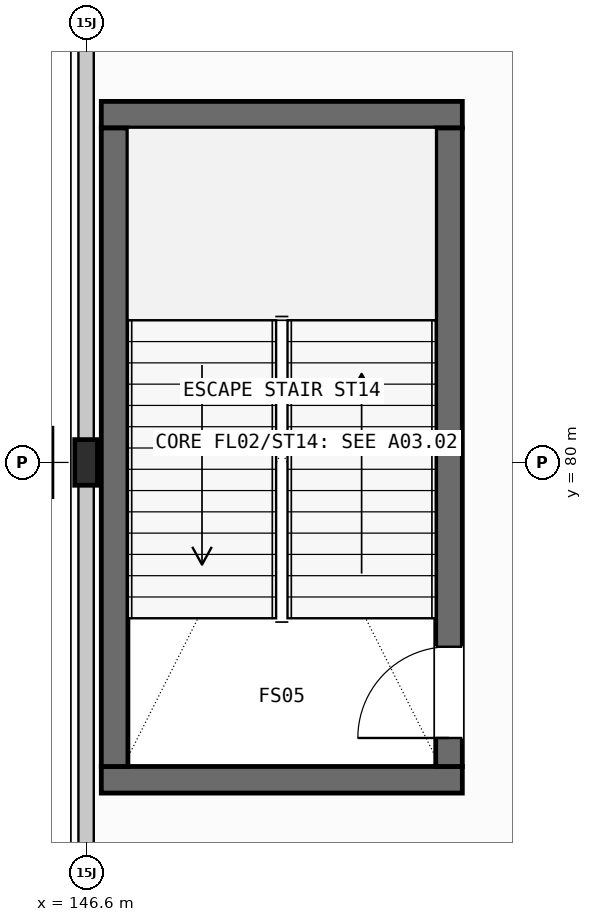
"""IFC4 building model, lengths in metres.
Left out: names, types, materials, properties, quantities, classifications, styles, units other than length and angle.
Written with IfcOpenShell. Run it as: python <this file> out.ifc"""

import sys

from ifc_helpers import new_model, si_unit, direction, frame, frame_2d, origin, origin_2d, place, context, subcontext, project, spatial, rectangle, i_section, extrude, element, fill, save


model = new_model("IFC4")
c1 = context("Model", 3, precision=1e-05, world=origin(), true_north=direction((0.0, 1.0)))
c2 = subcontext(c1, "Body", "Model", "MODEL_VIEW")
j1 = project(units=[si_unit("LENGTHUNIT", "METRE"), si_unit("PLANEANGLEUNIT", "RADIAN")], contexts=[c1])
p1 = place(None, origin())
s1 = spatial("IfcSite", under=j1, at=p1, CompositionType="ELEMENT")
p2 = place(p1, origin())
s2 = spatial("IfcBuilding", under=s1, at=p2, CompositionType="ELEMENT")
p3 = place(p2, frame((0.0, 0.0, 6.0)))
s3 = spatial("IfcBuildingStorey", under=s2, at=p3, CompositionType="ELEMENT", Elevation=6.0)
p4 = place(p3, frame((146.0, 80.0, 0.0), z_axis=(0.0, 0.0, 1.0), x_axis=(1.0, 0.0, 0.0)))
e1 = element("IfcColumn", 1, at=p4, inside=s3, PredefinedType="COLUMN", context=c2, shape_type="SweptSolid", body=[
    extrude(i_section(OverallWidth=0.3, OverallDepth=0.9, WebThickness=0.019, FlangeThickness=0.035, FilletRadius=0.03, at=origin_2d()), origin(), (0.0, 0.0, 1.0), 5.4),
])
p5 = place(p3, frame((146.6, 80.0, 0.0), z_axis=(0.0, 0.0, 1.0), x_axis=(1.0, 0.0, 0.0)))
e2 = element("IfcColumn", 2, at=p5, inside=s3, PredefinedType="COLUMN", context=c2, shape_type="SweptSolid", body=[
    extrude(i_section(OverallWidth=0.3, OverallDepth=0.6, WebThickness=0.015, FlangeThickness=0.03, FilletRadius=0.027, at=origin_2d()), origin(), (0.0, 0.0, 1.0), 5.4),
])
for number, where, z_axis, x_axis in (
    (3, (146.8, 75.825, 0.0), (0.0, 0.0, 1.0), (1.0, 0.0, 0.0)),
    (4, (146.8, 84.575, 0.0), (0.0, 0.0, 1.0), (1.0, 0.0, 0.0)),
):
    element("IfcWall", number, at=place(p3, frame(where, z_axis=z_axis, x_axis=x_axis)), inside=s3, PredefinedType="SHEAR", context=c2, shape_type="SweptSolid", body=[
        extrude(rectangle(XDim=4.75, YDim=0.35, at=frame_2d((2.375, 0.0))), origin(), (0.0, 0.0, 1.0), 5.4),
    ])
p6 = place(p3, frame((146.975, 76.0, 0.0), z_axis=(0.0, 0.0, 1.0), x_axis=(0.0, 1.0, 0.0)))
e5 = element("IfcWall", 5, at=p6, inside=s3, PredefinedType="SHEAR", context=c2, shape_type="SweptSolid", body=[
    extrude(rectangle(XDim=8.4, YDim=0.35, at=frame_2d((4.2, 0.0))), origin(), (0.0, 0.0, 1.0), 5.4),
])
p7 = place(p3, frame((151.375, 76.0, 0.0), z_axis=(0.0, 0.0, 1.0), x_axis=(0.0, 1.0, 0.0)))
e6 = element("IfcWall", 6, at=p7, inside=s3, PredefinedType="SHEAR", context=c2, shape_type="SweptSolid", body=[
    extrude(rectangle(XDim=8.4, YDim=0.35, at=frame_2d((4.2, 0.0))), origin(), (0.0, 0.0, 1.0), 5.4),
])
p8 = place(p7, frame((0.375, 0.0, 0.0)))
e7 = element("IfcOpeningElement", 7, at=p8, cuts=e6, PredefinedType="OPENING", context=c2, shape_type="SweptSolid", body=[
    extrude(rectangle(XDim=1.2, YDim=2.2, at=frame_2d((0.6, 1.1))), frame((0.0, 0.185, 0.0), z_axis=(0.0, -1.0, 0.0), x_axis=(1.0, 0.0, 0.0)), (0.0, 0.0, 1.0), 0.37),
])
for number, where, z_axis, x_axis in (
    (8, (146.6, 74.296, 0.0), (0.0, 0.0, 1.0), (0.0, 1.0, 0.0)),
    (9, (146.6, 80.296, 0.0), (0.0, 0.0, 1.0), (0.0, 1.0, 0.0)),
):
    element("IfcWall", number, at=place(p3, frame(where, z_axis=z_axis, x_axis=x_axis)), inside=s3, PredefinedType="STANDARD", context=c2, shape_type="SweptSolid", body=[
        extrude(rectangle(XDim=5.408, YDim=0.202, at=frame_2d((2.704, 0.0))), origin(), (0.0, 0.0, 1.0), 4.518),
    ])
p9 = place(p8, origin())
e10 = element("IfcDoor", 10, at=p9, inside=s3, OperationType="SINGLE_SWING_LEFT", PredefinedType="DOOR", context=c2, shape_type="SweptSolid", body=[
    extrude(rectangle(XDim=1.2, YDim=2.2, at=frame_2d((0.6, 1.1))), frame((0.0, 0.025, 0.0), z_axis=(0.0, -1.0, 0.0), x_axis=(1.0, 0.0, 0.0)), (0.0, 0.0, 1.0), 0.05),
])
fill(e7, e10)
save(model, sys.argv[1])
